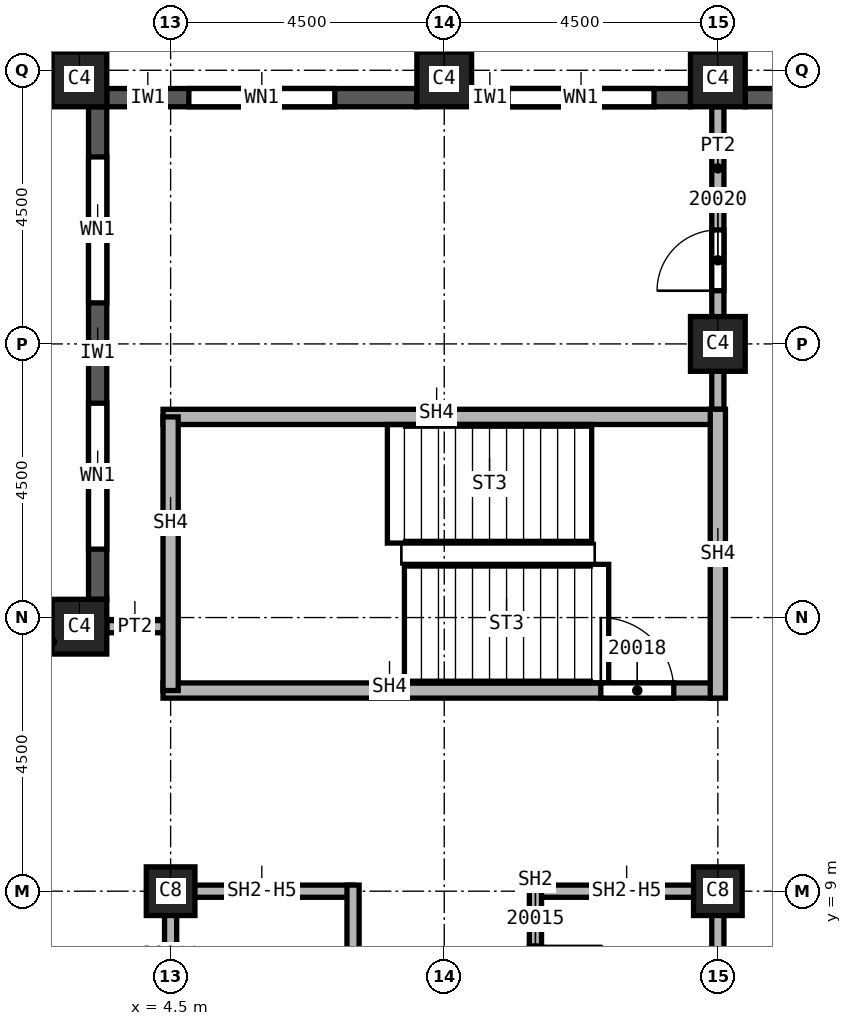
"""IFC4 building model, lengths in metres.
Left out: names, types, materials, properties, quantities, classifications, styles, units other than length and angle.
Written with IfcOpenShell. Run it as: python <this file> out.ifc"""

import sys

from ifc_helpers import new_model, si_unit, direction, frame, frame_2d, origin, origin_2d, place, context, subcontext, project, spatial, rectangle, extrude, element, fill, save


model = new_model("IFC4")
c1 = context("Model", 3, precision=1e-05, world=origin(), true_north=direction((0.0, 1.0)))
c2 = subcontext(c1, "Body", "Model", "MODEL_VIEW")
j1 = project(units=[si_unit("LENGTHUNIT", "METRE"), si_unit("PLANEANGLEUNIT", "RADIAN")], contexts=[c1])
p1 = place(None, origin())
s1 = spatial("IfcSite", under=j1, at=p1, CompositionType="ELEMENT")
p2 = place(p1, origin())
s2 = spatial("IfcBuilding", under=s1, at=p2, CompositionType="ELEMENT")
p3 = place(p2, frame((0.0, 0.0, 290.0)))
s3 = spatial("IfcBuildingStorey", under=s2, at=p3, CompositionType="ELEMENT", Elevation=290.0)
p4 = place(p3, frame((13.5, 18.0, 0.0), z_axis=(0.0, 0.0, 1.0), x_axis=(1.0, 0.0, 0.0)))
e1 = element("IfcColumn", 1, at=p4, inside=s3, PredefinedType="COLUMN", context=c2, shape_type="SweptSolid", body=[
    extrude(rectangle(XDim=0.9, YDim=0.9, at=origin_2d()), origin(), (0.0, 0.0, 1.0), 3.59),
])
for number, where, z_axis, x_axis in (
    (2, (4.5, 9.0, 0.0), (0.0, 0.0, 1.0), (1.0, 0.0, 0.0)),
    (3, (13.5, 9.0, 0.0), (0.0, 0.0, 1.0), (1.0, 0.0, 0.0)),
):
    element("IfcColumn", number, at=place(p3, frame(where, z_axis=z_axis, x_axis=x_axis)), inside=s3, PredefinedType="COLUMN", context=c2, shape_type="SweptSolid", body=[
        extrude(rectangle(XDim=0.8, YDim=0.8, at=origin_2d()), origin(), (0.0, 0.0, 1.0), 3.59),
    ])
for number, where, z_axis, x_axis in (
    (4, (3.0, 22.35, 0.0), (0.0, 0.0, 1.0), (1.0, 0.0, 0.0)),
    (5, (9.0, 22.35, 0.0), (0.0, 0.0, 1.0), (1.0, 0.0, 0.0)),
    (6, (13.5, 22.35, 0.0), (0.0, 0.0, 1.0), (1.0, 0.0, 0.0)),
    (7, (3.0, 13.35, 0.0), (0.0, 0.0, 1.0), (1.0, 0.0, 0.0)),
):
    element("IfcColumn", number, at=place(p3, frame(where, z_axis=z_axis, x_axis=x_axis)), inside=s3, PredefinedType="COLUMN", context=c2, shape_type="SweptSolid", body=[
        extrude(rectangle(XDim=0.9, YDim=0.9, at=origin_2d()), origin(), (0.0, 0.0, 1.0), 3.59),
    ])
p5 = place(p3, frame((17.55, 22.05, 0.0), z_axis=(0.0, 0.0, 1.0), x_axis=(-1.0, 0.0, 0.0)))
e8 = element("IfcWall", 8, at=p5, inside=s3, PredefinedType="SOLIDWALL", context=c2, shape_type="SweptSolid", body=[
    extrude(rectangle(XDim=3.6, YDim=0.3, at=frame_2d((1.8, 0.0))), origin(), (0.0, 0.0, 1.0), 2.99),
])
p6 = place(p5, frame((0.775, 0.0, 0.8)))
e9 = element("IfcOpeningElement", 9, at=p6, cuts=e8, PredefinedType="OPENING", context=c2, shape_type="SweptSolid", body=[
    extrude(rectangle(XDim=1.0, YDim=1.95, at=frame_2d((0.5, 0.975))), frame((0.0, 0.15, 0.0), z_axis=(0.0, -1.0, 0.0), x_axis=(1.0, 0.0, 0.0)), (0.0, 0.0, 1.0), 0.3),
])
p7 = place(p5, frame((2.375, 0.0, 0.8)))
e10 = element("IfcOpeningElement", 10, at=p7, cuts=e8, PredefinedType="OPENING", context=c2, shape_type="SweptSolid", body=[
    extrude(rectangle(XDim=0.6, YDim=1.95, at=frame_2d((0.3, 0.975))), frame((0.0, 0.15, 0.0), z_axis=(0.0, -1.0, 0.0), x_axis=(1.0, 0.0, 0.0)), (0.0, 0.0, 1.0), 0.3),
])
p8 = place(p3, frame((13.05, 22.05, 0.0), z_axis=(0.0, 0.0, 1.0), x_axis=(-1.0, 0.0, 0.0)))
e11 = element("IfcWall", 11, at=p8, inside=s3, PredefinedType="SOLIDWALL", context=c2, shape_type="SweptSolid", body=[
    extrude(rectangle(XDim=3.6, YDim=0.3, at=frame_2d((1.8, 0.0))), origin(), (0.0, 0.0, 1.0), 2.99),
])
p9 = place(p8, frame((0.6, 0.0, 0.8)))
e12 = element("IfcOpeningElement", 12, at=p9, cuts=e11, PredefinedType="OPENING", context=c2, shape_type="SweptSolid", body=[
    extrude(rectangle(XDim=2.4, YDim=1.95, at=frame_2d((1.2, 0.975))), frame((0.0, 0.15, 0.0), z_axis=(0.0, -1.0, 0.0), x_axis=(1.0, 0.0, 0.0)), (0.0, 0.0, 1.0), 0.3),
])
p10 = place(p3, frame((8.55, 22.05, 0.0), z_axis=(0.0, 0.0, 1.0), x_axis=(-1.0, 0.0, 0.0)))
e13 = element("IfcWall", 13, at=p10, inside=s3, PredefinedType="SOLIDWALL", context=c2, shape_type="SweptSolid", body=[
    extrude(rectangle(XDim=5.1, YDim=0.3, at=frame_2d((2.55, 0.0))), origin(), (0.0, 0.0, 1.0), 2.99),
])
p11 = place(p10, frame((1.35, 0.0, 0.8)))
e14 = element("IfcOpeningElement", 14, at=p11, cuts=e13, PredefinedType="OPENING", context=c2, shape_type="SweptSolid", body=[
    extrude(rectangle(XDim=2.4, YDim=1.95, at=frame_2d((1.2, 0.975))), frame((0.0, 0.15, 0.0), z_axis=(0.0, -1.0, 0.0), x_axis=(1.0, 0.0, 0.0)), (0.0, 0.0, 1.0), 0.3),
])
p12 = place(p3, frame((3.3, 21.9, 0.0), z_axis=(0.0, 0.0, 1.0), x_axis=(0.0, -1.0, 0.0)))
e15 = element("IfcWall", 15, at=p12, inside=s3, PredefinedType="SOLIDWALL", context=c2, shape_type="SweptSolid", body=[
    extrude(rectangle(XDim=8.1, YDim=0.3, at=frame_2d((4.05, 0.0))), origin(), (0.0, 0.0, 1.0), 2.99),
])
p13 = place(p12, frame((0.825, 0.0, 0.8)))
e16 = element("IfcOpeningElement", 16, at=p13, cuts=e15, PredefinedType="OPENING", context=c2, shape_type="SweptSolid", body=[
    extrude(rectangle(XDim=2.4, YDim=1.95, at=frame_2d((1.2, 0.975))), frame((0.0, 0.15, 0.0), z_axis=(0.0, -1.0, 0.0), x_axis=(1.0, 0.0, 0.0)), (0.0, 0.0, 1.0), 0.3),
])
p14 = place(p12, frame((4.875, 0.0, 0.8)))
e17 = element("IfcOpeningElement", 17, at=p14, cuts=e15, PredefinedType="OPENING", context=c2, shape_type="SweptSolid", body=[
    extrude(rectangle(XDim=2.4, YDim=1.95, at=frame_2d((1.2, 0.975))), frame((0.0, 0.15, 0.0), z_axis=(0.0, -1.0, 0.0), x_axis=(1.0, 0.0, 0.0)), (0.0, 0.0, 1.0), 0.3),
])
p15 = place(p3, frame((3.45, 13.35, 0.0), z_axis=(0.0, 0.0, 1.0), x_axis=(1.0, 0.0, 0.0)))
e18 = element("IfcWall", 18, at=p15, inside=s3, PredefinedType="PARTITIONING", context=c2, shape_type="SweptSolid", body=[
    extrude(rectangle(XDim=1.049, YDim=0.2, at=frame_2d((0.524, 0.0))), origin(), (0.0, 0.0, 1.0), 3.59),
])
p16 = place(p3, frame((13.5, 16.675, 0.0), z_axis=(0.0, 0.0, 1.0), x_axis=(0.0, 1.0, 0.0)))
e19 = element("IfcWall", 19, at=p16, inside=s3, PredefinedType="PARTITIONING", context=c2, shape_type="SweptSolid", body=[
    extrude(rectangle(XDim=5.225, YDim=0.2, at=frame_2d((2.612, 0.0))), origin(), (0.0, 0.0, 1.0), 3.59),
])
p17 = place(p16, frame((2.2, 0.0, 0.0)))
e20 = element("IfcOpeningElement", 20, at=p17, cuts=e19, PredefinedType="OPENING", context=c2, shape_type="SweptSolid", body=[
    extrude(rectangle(XDim=1.0, YDim=2.1, at=frame_2d((0.5, 1.05))), frame((0.0, 0.1, 0.0), z_axis=(0.0, -1.0, 0.0), x_axis=(1.0, 0.0, 0.0)), (0.0, 0.0, 1.0), 0.2),
])
p18 = place(p3, frame((4.5, 0.0, 0.0), z_axis=(0.0, 0.0, 1.0), x_axis=(0.0, 1.0, 0.0)))
e21 = element("IfcWall", 21, at=p18, inside=s3, PredefinedType="SOLIDWALL", context=c2, shape_type="SweptSolid", body=[
    extrude(rectangle(XDim=9.1, YDim=0.2, at=frame_2d((4.55, 0.0))), origin(), (0.0, 0.0, 1.0), 2.828),
])
p19 = place(p18, frame((1.6, 0.0, 0.0)))
e22 = element("IfcOpeningElement", 22, at=p19, cuts=e21, PredefinedType="OPENING", context=c2, shape_type="SweptSolid", body=[
    extrude(rectangle(XDim=1.1, YDim=2.1, at=frame_2d((0.55, 1.05))), frame((0.0, 0.1, 0.0), z_axis=(0.0, -1.0, 0.0), x_axis=(1.0, 0.0, 0.0)), (0.0, 0.0, 1.0), 0.2),
])
p20 = place(p18, frame((6.4, 0.0, 0.0)))
e23 = element("IfcOpeningElement", 23, at=p20, cuts=e21, PredefinedType="OPENING", context=c2, shape_type="SweptSolid", body=[
    extrude(rectangle(XDim=1.1, YDim=2.1, at=frame_2d((0.55, 1.05))), frame((0.0, 0.1, 0.0), z_axis=(0.0, -1.0, 0.0), x_axis=(1.0, 0.0, 0.0)), (0.0, 0.0, 1.0), 0.2),
])
p21 = place(p3, frame((4.5, 9.0, 0.0), z_axis=(0.0, 0.0, 1.0), x_axis=(1.0, 0.0, 0.0)))
e24 = element("IfcWall", 24, at=p21, inside=s3, PredefinedType="SOLIDWALL", context=c2, shape_type="SweptSolid", body=[
    extrude(rectangle(XDim=3.0, YDim=0.2, at=frame_2d((1.5, 0.0))), origin(), (0.0, 0.0, 1.0), 2.828),
])
p22 = place(p3, frame((7.5, 9.1, 0.0), z_axis=(0.0, 0.0, 1.0), x_axis=(0.0, -1.0, 0.0)))
e25 = element("IfcWall", 25, at=p22, inside=s3, PredefinedType="SOLIDWALL", context=c2, shape_type="SweptSolid", body=[
    extrude(rectangle(XDim=6.225, YDim=0.2, at=frame_2d((3.113, 0.0))), origin(), (0.0, 0.0, 1.0), 3.59),
])
p23 = place(p3, frame((10.5, 9.0, 0.0), z_axis=(0.0, 0.0, 1.0), x_axis=(1.0, 0.0, 0.0)))
e26 = element("IfcWall", 26, at=p23, inside=s3, PredefinedType="SOLIDWALL", context=c2, shape_type="SweptSolid", body=[
    extrude(rectangle(XDim=3.0, YDim=0.2, at=frame_2d((1.5, 0.0))), origin(), (0.0, 0.0, 1.0), 2.828),
])
p24 = place(p3, frame((10.5, 9.1, 0.0), z_axis=(0.0, 0.0, 1.0), x_axis=(0.0, -1.0, 0.0)))
e27 = element("IfcWall", 27, at=p24, inside=s3, PredefinedType="SOLIDWALL", context=c2, shape_type="SweptSolid", body=[
    extrude(rectangle(XDim=3.225, YDim=0.2, at=frame_2d((1.613, 0.0))), origin(), (0.0, 0.0, 1.0), 3.59),
])
p25 = place(p24, frame((1.0, 0.0, 0.0)))
e28 = element("IfcOpeningElement", 28, at=p25, cuts=e27, PredefinedType="OPENING", context=c2, shape_type="SweptSolid", body=[
    extrude(rectangle(XDim=1.1, YDim=2.1, at=frame_2d((0.55, 1.05))), frame((0.0, 0.1, 0.0), z_axis=(0.0, -1.0, 0.0), x_axis=(1.0, 0.0, 0.0)), (0.0, 0.0, 1.0), 0.2),
])
p26 = place(p3, frame((13.5, 9.1, 0.0), z_axis=(0.0, 0.0, 1.0), x_axis=(0.0, -1.0, 0.0)))
e29 = element("IfcWall", 29, at=p26, inside=s3, PredefinedType="SOLIDWALL", context=c2, shape_type="SweptSolid", body=[
    extrude(rectangle(XDim=3.1, YDim=0.2, at=frame_2d((1.55, 0.0))), origin(), (0.0, 0.0, 1.0), 2.828),
])
p27 = place(p3, frame((4.375, 12.3, 0.0), z_axis=(0.0, 0.0, 1.0), x_axis=(1.0, 0.0, 0.0)))
e30 = element("IfcWall", 30, at=p27, inside=s3, PredefinedType="SOLIDWALL", context=c2, shape_type="SweptSolid", body=[
    extrude(rectangle(XDim=9.125, YDim=0.25, at=frame_2d((4.562, 0.0))), origin(), (0.0, 0.0, 1.0), 3.59),
])
p28 = place(p27, frame((7.2, 0.0, 0.0)))
e31 = element("IfcOpeningElement", 31, at=p28, cuts=e30, PredefinedType="OPENING", context=c2, shape_type="SweptSolid", body=[
    extrude(rectangle(XDim=1.2, YDim=2.1, at=frame_2d((0.6, 1.05))), frame((0.0, 0.125, 0.0), z_axis=(0.0, -1.0, 0.0), x_axis=(1.0, 0.0, 0.0)), (0.0, 0.0, 1.0), 0.25),
])
p29 = place(p3, frame((4.375, 16.8, 0.0), z_axis=(0.0, 0.0, 1.0), x_axis=(1.0, 0.0, 0.0)))
e32 = element("IfcWall", 32, at=p29, inside=s3, PredefinedType="SOLIDWALL", context=c2, shape_type="SweptSolid", body=[
    extrude(rectangle(XDim=9.125, YDim=0.25, at=frame_2d((4.562, 0.0))), origin(), (0.0, 0.0, 1.0), 3.59),
])
p30 = place(p3, frame((4.5, 12.3, 0.0), z_axis=(0.0, 0.0, 1.0), x_axis=(0.0, 1.0, 0.0)))
e33 = element("IfcWall", 33, at=p30, inside=s3, PredefinedType="SOLIDWALL", context=c2, shape_type="SweptSolid", body=[
    extrude(rectangle(XDim=4.5, YDim=0.25, at=frame_2d((2.25, 0.0))), origin(), (0.0, 0.0, 1.0), 3.59),
])
p31 = place(p3, frame((13.5, 12.175, 0.0), z_axis=(0.0, 0.0, 1.0), x_axis=(0.0, 1.0, 0.0)))
e34 = element("IfcWall", 34, at=p31, inside=s3, PredefinedType="SOLIDWALL", context=c2, shape_type="SweptSolid", body=[
    extrude(rectangle(XDim=4.75, YDim=0.25, at=frame_2d((2.375, 0.0))), origin(), (0.0, 0.0, 1.0), 3.59),
])
p32 = place(p9, origin())
e35 = element("IfcWindow", 35, at=p32, inside=s3, PartitioningType="SINGLE_PANEL", PredefinedType="WINDOW", context=c2, shape_type="SweptSolid", body=[
    extrude(rectangle(XDim=2.4, YDim=1.95, at=frame_2d((1.2, 0.975))), frame((0.0, 0.03, 0.0), z_axis=(0.0, -1.0, 0.0), x_axis=(1.0, 0.0, 0.0)), (0.0, 0.0, 1.0), 0.06),
])
fill(e12, e35)
p33 = place(p11, origin())
e36 = element("IfcWindow", 36, at=p33, inside=s3, PartitioningType="SINGLE_PANEL", PredefinedType="WINDOW", context=c2, shape_type="SweptSolid", body=[
    extrude(rectangle(XDim=2.4, YDim=1.95, at=frame_2d((1.2, 0.975))), frame((0.0, 0.03, 0.0), z_axis=(0.0, -1.0, 0.0), x_axis=(1.0, 0.0, 0.0)), (0.0, 0.0, 1.0), 0.06),
])
fill(e14, e36)
p34 = place(p13, origin())
e37 = element("IfcWindow", 37, at=p34, inside=s3, PartitioningType="SINGLE_PANEL", PredefinedType="WINDOW", context=c2, shape_type="SweptSolid", body=[
    extrude(rectangle(XDim=2.4, YDim=1.95, at=frame_2d((1.2, 0.975))), frame((0.0, 0.03, 0.0), z_axis=(0.0, -1.0, 0.0), x_axis=(1.0, 0.0, 0.0)), (0.0, 0.0, 1.0), 0.06),
])
fill(e16, e37)
p35 = place(p14, origin())
e38 = element("IfcWindow", 38, at=p35, inside=s3, PartitioningType="SINGLE_PANEL", PredefinedType="WINDOW", context=c2, shape_type="SweptSolid", body=[
    extrude(rectangle(XDim=2.4, YDim=1.95, at=frame_2d((1.2, 0.975))), frame((0.0, 0.03, 0.0), z_axis=(0.0, -1.0, 0.0), x_axis=(1.0, 0.0, 0.0)), (0.0, 0.0, 1.0), 0.06),
])
fill(e17, e38)
p36 = place(p28, origin())
e39 = element("IfcDoor", 39, at=p36, inside=s3, OperationType="SINGLE_SWING_LEFT", PredefinedType="DOOR", context=c2, shape_type="SweptSolid", body=[
    extrude(rectangle(XDim=1.2, YDim=2.1, at=frame_2d((0.6, 1.05))), frame((0.0, 0.025, 0.0), z_axis=(0.0, -1.0, 0.0), x_axis=(1.0, 0.0, 0.0)), (0.0, 0.0, 1.0), 0.05),
])
fill(e31, e39)
p37 = place(p17, origin())
e40 = element("IfcDoor", 40, at=p37, inside=s3, OperationType="SINGLE_SWING_LEFT", PredefinedType="DOOR", context=c2, shape_type="SweptSolid", body=[
    extrude(rectangle(XDim=1.0, YDim=2.1, at=frame_2d((0.5, 1.05))), frame((0.0, 0.025, 0.0), z_axis=(0.0, -1.0, 0.0), x_axis=(1.0, 0.0, 0.0)), (0.0, 0.0, 1.0), 0.05),
])
fill(e20, e40)
save(model, sys.argv[1])
